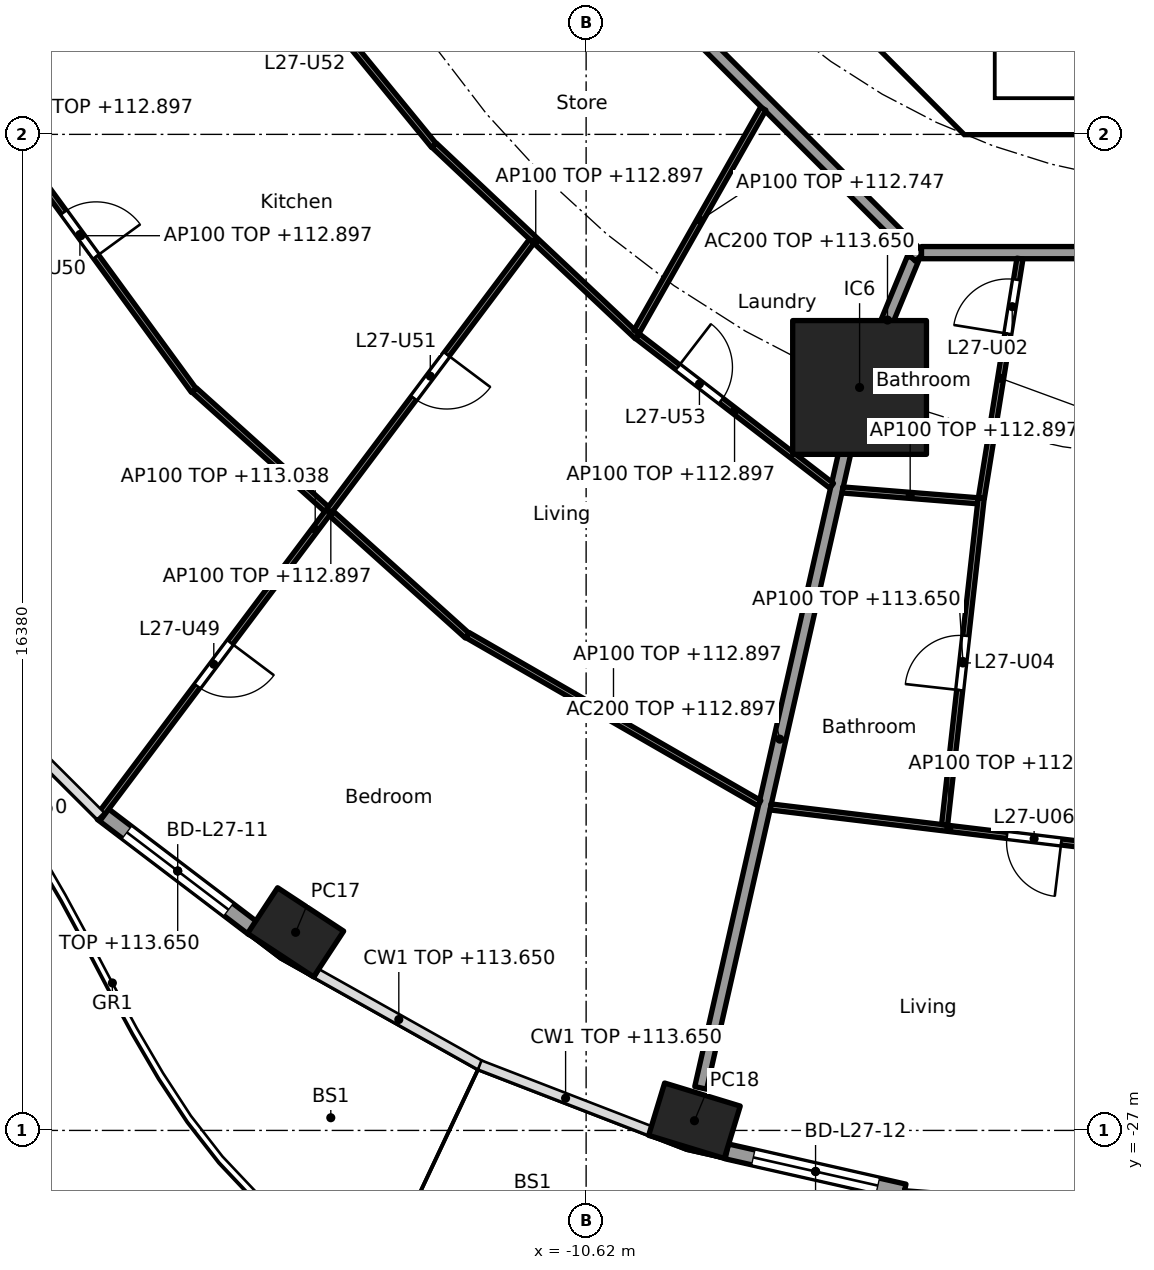
"""IFC4 building model, lengths in metres.
Left out: names, types, materials, properties, quantities, classifications, styles, units other than length and angle.
Written with IfcOpenShell. Run it as: python <this file> out.ifc"""

import sys

from ifc_helpers import new_model, si_unit, direction, frame, frame_2d, origin, origin_2d, place, context, subcontext, project, spatial, polyline, rectangle, hollow_rectangle, outline, extrude, element, fill, save


model = new_model("IFC4")
c1 = context("Model", 3, precision=1e-05, world=origin(), true_north=direction((0.0, 1.0)))
c2 = subcontext(c1, "Body", "Model", "MODEL_VIEW")
j1 = project(units=[si_unit("LENGTHUNIT", "METRE"), si_unit("PLANEANGLEUNIT", "RADIAN")], contexts=[c1])
p1 = place(None, origin())
s1 = spatial("IfcSite", under=j1, at=p1, CompositionType="ELEMENT")
p2 = place(p1, origin())
s2 = spatial("IfcBuilding", under=s1, at=p2, CompositionType="ELEMENT")
p3 = place(p2, frame((0.0, 0.0, 110.3)))
s3 = spatial("IfcBuildingStorey", under=s2, at=p3, CompositionType="ELEMENT", Elevation=110.3)
for number, where, z_axis, x_axis in (
    (1, (-15.397, -23.742, 0.0), (0.0, 0.0, 1.0), (0.836, -0.549, 0.0)),
    (2, (-8.839, -26.841, 0.0), (0.0, 0.0, 1.0), (0.957, -0.292, 0.0)),
):
    element("IfcColumn", number, at=place(p3, frame(where, z_axis=z_axis, x_axis=x_axis)), inside=s3, PredefinedType="COLUMN", context=c2, shape_type="SweptSolid", body=[
        extrude(hollow_rectangle(XDim=1.3, YDim=0.9, WallThickness=0.045, at=origin_2d()), origin(), (0.0, 0.0, 1.0), 3.7),
    ])
p4 = place(p3, frame((-6.123, -14.782, 0.0), z_axis=(0.0, 0.0, 1.0), x_axis=(1.0, 0.0, 0.0)))
e3 = element("IfcColumn", 3, at=p4, inside=s3, PredefinedType="COLUMN", context=c2, shape_type="SweptSolid", body=[
    extrude(rectangle(XDim=2.2, YDim=2.2, at=origin_2d()), origin(), (0.0, 0.0, 1.0), 3.7),
])
p5 = place(p3, frame((-16.089, -23.682, 0.0), z_axis=(0.0, 0.0, 1.0), x_axis=(-0.796037575978, 0.605247203736, 0.0)))
e4 = element("IfcWall", 4, at=p5, inside=s3, PredefinedType="SOLIDWALL", context=c2, shape_type="SweptSolid", body=[
    extrude(rectangle(XDim=3.134, YDim=0.25, at=frame_2d((1.567, 0.0))), origin(), (0.0, 0.0, 1.0), 3.35),
])
p6 = place(p5, frame((0.517, 0.0, 0.0)))
e5 = element("IfcOpeningElement", 5, at=p6, cuts=e4, PredefinedType="OPENING", context=c2, shape_type="SweptSolid", body=[
    extrude(rectangle(XDim=2.1, YDim=2.4, at=frame_2d((1.05, 1.2))), frame((0.0, 0.135, 0.0), z_axis=(0.0, -1.0, 0.0), x_axis=(1.0, 0.0, 0.0)), (0.0, 0.0, 1.0), 0.27),
])
p7 = place(p3, frame((-5.387, -28.006, 0.0), z_axis=(0.0, 0.0, 1.0), x_axis=(-0.975317607872, 0.220806620767, 0.0)))
e6 = element("IfcWall", 6, at=p7, inside=s3, PredefinedType="SOLIDWALL", context=c2, shape_type="SweptSolid", body=[
    extrude(rectangle(XDim=2.993, YDim=0.25, at=frame_2d((1.497, 0.0))), origin(), (0.0, 0.0, 1.0), 3.35),
])
p8 = place(p7, frame((0.447, 0.0, 0.0)))
e7 = element("IfcOpeningElement", 7, at=p8, cuts=e6, PredefinedType="OPENING", context=c2, shape_type="SweptSolid", body=[
    extrude(rectangle(XDim=2.1, YDim=2.4, at=frame_2d((1.05, 1.2))), frame((0.0, 0.135, 0.0), z_axis=(0.0, -1.0, 0.0), x_axis=(1.0, 0.0, 0.0)), (0.0, 0.0, 1.0), 0.27),
])
p9 = place(p3, frame((-9.988, -4.613, 0.0), z_axis=(0.0, 0.0, 1.0), x_axis=(0.707106781187, -0.707106781187, 0.0)))
e8 = element("IfcWall", 8, at=p9, inside=s3, PredefinedType="SHEAR", context=c2, shape_type="SweptSolid", body=[
    extrude(rectangle(XDim=7.602, YDim=0.6, at=frame_2d((3.801, 0.0))), origin(), (0.0, 0.0, 1.0), 3.35),
])
p10 = place(p9, frame((6.151, 0.0, 0.0)))
e9 = element("IfcOpeningElement", 9, at=p10, cuts=e8, PredefinedType="OPENING", context=c2, shape_type="SweptSolid", body=[
    extrude(rectangle(XDim=1.1, YDim=2.1, at=frame_2d((0.55, 1.05))), frame((0.0, 0.31, 0.0), z_axis=(0.0, -1.0, 0.0), x_axis=(1.0, 0.0, 0.0)), (0.0, 0.0, 1.0), 0.62),
])
p11 = place(p3, origin())
e10 = element("IfcWall", 10, at=p11, inside=s3, PredefinedType="SHEAR", context=c2, shape_type="SweptSolid", body=[
    extrude(outline(polyline([(-4.152, -10.025), (4.152, -10.025), (4.401, -9.776), (4.825, -10.2), (4.401, -10.625), (-4.401, -10.625), (-4.825, -10.2), (-4.401, -9.776), (-4.152, -10.025)])), origin(), (0.0, 0.0, 1.0), 3.35),
])
p12 = place(p3, origin())
e11 = element("IfcWall", 11, at=p12, inside=s3, PredefinedType="SOLIDWALL", context=c2, shape_type="SweptSolid", body=[
    extrude(outline(polyline([(-3.9, -10.025), (-4.1, -10.025), (-4.1, -7.025), (-3.9, -7.025), (-3.9, -10.025)])), origin(), (0.0, 0.0, 1.0), 3.35),
])
p13 = place(p3, frame((-5.243, -12.657, 0.0), z_axis=(0.0, 0.0, 1.0), x_axis=(-0.382668627144, -0.923885664896, 0.0)))
e12 = element("IfcWall", 12, at=p13, inside=s3, PredefinedType="PARTITIONING", context=c2, shape_type="SweptSolid", body=[
    extrude(rectangle(XDim=2.2, YDim=0.2, at=frame_2d((1.1, 0.0))), origin(), (0.0, 0.0, 1.0), 3.35),
])
p14 = place(p3, frame((-6.134, -14.831, 0.0), z_axis=(0.0, 0.0, 1.0), x_axis=(-0.221225405869, -0.975222702667, 0.0)))
e13 = element("IfcWall", 13, at=p14, inside=s3, PredefinedType="PARTITIONING", context=c2, shape_type="SweptSolid", body=[
    extrude(rectangle(XDim=11.761, YDim=0.2, at=frame_2d((5.88, 0.0))), origin(), (0.0, 0.0, 1.0), 2.597),
])
p15 = place(p3, frame((-12.635, -5.134, 0.0), z_axis=(0.0, 0.0, 1.0), x_axis=(0.707106781187, -0.707106781187, 0.0)))
e14 = element("IfcWall", 14, at=p15, inside=s3, PredefinedType="PARTITIONING", context=c2, shape_type="SweptSolid", body=[
    extrude(rectangle(XDim=10.609, YDim=0.2, at=frame_2d((5.305, 0.0))), origin(), (0.0, 0.0, 1.0), 3.35),
])
p16 = place(p3, frame((-5.104, -12.565, 0.0), z_axis=(0.0, 0.0, 1.0), x_axis=(1.0, 0.0, 0.0)))
e15 = element("IfcWall", 15, at=p16, inside=s3, PredefinedType="PARTITIONING", context=c2, shape_type="SweptSolid", body=[
    extrude(rectangle(XDim=10.409, YDim=0.2, at=frame_2d((5.205, 0.0))), origin(), (0.0, 0.0, 1.0), 3.35),
])
p17 = place(p16, frame((2.87, 0.0, 0.0)))
e16 = element("IfcOpeningElement", 16, at=p17, cuts=e15, PredefinedType="OPENING", context=c2, shape_type="SweptSolid", body=[
    extrude(rectangle(XDim=1.0, YDim=2.1, at=frame_2d((0.5, 1.05))), frame((0.0, 0.11, 0.0), z_axis=(0.0, -1.0, 0.0), x_axis=(1.0, 0.0, 0.0)), (0.0, 0.0, 1.0), 0.22),
])
p18 = place(p3, frame((-14.825, -6.148, 0.0), z_axis=(0.0, 0.0, 1.0), x_axis=(-0.860400431487, -0.509618580408, 0.0)))
e17 = element("IfcWall", 17, at=p18, inside=s3, PredefinedType="PARTITIONING", context=c2, shape_type="SweptSolid", body=[
    extrude(rectangle(XDim=11.688, YDim=0.1, at=frame_2d((5.844, 0.0))), origin(), (0.0, 0.0, 1.0), 2.597),
])
p19 = place(p18, frame((8.877, 0.0, 0.0)))
e18 = element("IfcOpeningElement", 18, at=p19, cuts=e17, PredefinedType="OPENING", context=c2, shape_type="SweptSolid", body=[
    extrude(rectangle(XDim=0.9, YDim=2.1, at=frame_2d((0.45, 1.05))), frame((0.0, 0.06, 0.0), z_axis=(0.0, -1.0, 0.0), x_axis=(1.0, 0.0, 0.0)), (0.0, 0.0, 1.0), 0.12),
])
p20 = place(p3, frame((-16.214, -7.028, 0.0), z_axis=(0.0, 0.0, 1.0), x_axis=(0.633412158846, -0.773814601197, 0.0)))
e19 = element("IfcWall", 19, at=p20, inside=s3, PredefinedType="PARTITIONING", context=c2, shape_type="SweptSolid", body=[
    extrude(rectangle(XDim=4.879, YDim=0.1, at=frame_2d((2.439, 0.0))), origin(), (0.0, 0.0, 1.0), 2.597),
])
p21 = place(p20, frame((1.965, 0.0, 0.0)))
e20 = element("IfcOpeningElement", 20, at=p21, cuts=e19, PredefinedType="OPENING", context=c2, shape_type="SweptSolid", body=[
    extrude(rectangle(XDim=0.9, YDim=2.1, at=frame_2d((0.45, 1.05))), frame((0.0, 0.06, 0.0), z_axis=(0.0, -1.0, 0.0), x_axis=(1.0, 0.0, 0.0)), (0.0, 0.0, 1.0), 0.12),
])
p22 = place(p3, frame((-20.79, -9.739, 0.0), z_axis=(0.0, 0.0, 1.0), x_axis=(0.589595343438, -0.807698787294, 0.0)))
e21 = element("IfcWall", 21, at=p22, inside=s3, PredefinedType="PARTITIONING", context=c2, shape_type="SweptSolid", body=[
    extrude(rectangle(XDim=6.308, YDim=0.1, at=frame_2d((3.154, 0.0))), origin(), (0.0, 0.0, 1.0), 2.597),
])
p23 = place(p22, frame((2.679, 0.0, 0.0)))
e22 = element("IfcOpeningElement", 22, at=p23, cuts=e21, PredefinedType="OPENING", context=c2, shape_type="SweptSolid", body=[
    extrude(rectangle(XDim=0.9, YDim=2.1, at=frame_2d((0.45, 1.05))), frame((0.0, 0.06, 0.0), z_axis=(0.0, -1.0, 0.0), x_axis=(1.0, 0.0, 0.0)), (0.0, 0.0, 1.0), 0.12),
])
p24 = place(p3, frame((-13.118, -10.8, 0.0), z_axis=(0.0, 0.0, 1.0), x_axis=(0.72818280142, -0.685382964273, 0.0)))
e23 = element("IfcWall", 23, at=p24, inside=s3, PredefinedType="PARTITIONING", context=c2, shape_type="SweptSolid", body=[
    extrude(rectangle(XDim=4.586, YDim=0.1, at=frame_2d((2.293, 0.0))), origin(), (0.0, 0.0, 1.0), 2.597),
])
p25 = place(p3, frame((-17.063, -14.827, 0.0), z_axis=(0.0, 0.0, 1.0), x_axis=(0.743485143578, -0.668752451419, 0.0)))
e24 = element("IfcWall", 24, at=p25, inside=s3, PredefinedType="PARTITIONING", context=c2, shape_type="SweptSolid", body=[
    extrude(rectangle(XDim=6.037, YDim=0.1, at=frame_2d((3.019, 0.0))), origin(), (0.0, 0.0, 1.0), 2.597),
])
p26 = place(p3, frame((-11.515, -12.377, 0.0), z_axis=(0.0, 0.0, 1.0), x_axis=(-0.600741245554, -0.799443528893, 0.0)))
e25 = element("IfcWall", 25, at=p26, inside=s3, PredefinedType="PARTITIONING", context=c2, shape_type="SweptSolid", body=[
    extrude(rectangle(XDim=11.853, YDim=0.1, at=frame_2d((5.927, 0.0))), origin(), (0.0, 0.0, 1.0), 2.738),
])
p27 = place(p26, frame((8.253, 0.0, 0.0)))
e26 = element("IfcOpeningElement", 26, at=p27, cuts=e25, PredefinedType="OPENING", context=c2, shape_type="SweptSolid", body=[
    extrude(rectangle(XDim=0.9, YDim=2.1, at=frame_2d((0.45, 1.05))), frame((0.0, 0.06, 0.0), z_axis=(0.0, -1.0, 0.0), x_axis=(1.0, 0.0, 0.0)), (0.0, 0.0, 1.0), 0.12),
])
p28 = place(p26, frame((2.326, 0.0, 0.0)))
e27 = element("IfcOpeningElement", 27, at=p28, cuts=e25, PredefinedType="OPENING", context=c2, shape_type="SweptSolid", body=[
    extrude(rectangle(XDim=0.9, YDim=2.1, at=frame_2d((0.45, 1.05))), frame((0.0, 0.06, 0.0), z_axis=(0.0, -1.0, 0.0), x_axis=(1.0, 0.0, 0.0)), (0.0, 0.0, 1.0), 0.12),
])
p29 = place(p3, frame((-7.707, -10.198, 0.0), z_axis=(0.0, 0.0, 1.0), x_axis=(-0.493986531217, -0.869469554945, 0.0)))
e28 = element("IfcWall", 28, at=p29, inside=s3, PredefinedType="PARTITIONING", context=c2, shape_type="SweptSolid", body=[
    extrude(rectangle(XDim=4.217, YDim=0.1, at=frame_2d((2.109, 0.0))), origin(), (0.0, 0.0, 1.0), 2.447),
])
p30 = place(p3, frame((-9.775, -13.939, 0.0), z_axis=(0.0, 0.0, 1.0), x_axis=(0.792162117554, -0.610310723741, 0.0)))
e29 = element("IfcWall", 29, at=p30, inside=s3, PredefinedType="PARTITIONING", context=c2, shape_type="SweptSolid", body=[
    extrude(rectangle(XDim=4.03, YDim=0.1, at=frame_2d((2.015, 0.0))), origin(), (0.0, 0.0, 1.0), 2.597),
])
p31 = place(p30, frame((0.836, 0.0, 0.0)))
e30 = element("IfcOpeningElement", 30, at=p31, cuts=e29, PredefinedType="OPENING", context=c2, shape_type="SweptSolid", body=[
    extrude(rectangle(XDim=0.9, YDim=2.1, at=frame_2d((0.45, 1.05))), frame((0.0, 0.06, 0.0), z_axis=(0.0, -1.0, 0.0), x_axis=(1.0, 0.0, 0.0)), (0.0, 0.0, 1.0), 0.12),
])
p32 = place(p3, frame((-12.568, -18.856, 0.0), z_axis=(0.0, 0.0, 1.0), x_axis=(0.866533437451, -0.499119025664, 0.0)))
e31 = element("IfcWall", 31, at=p32, inside=s3, PredefinedType="PARTITIONING", context=c2, shape_type="SweptSolid", body=[
    extrude(rectangle(XDim=5.535, YDim=0.1, at=frame_2d((2.768, 0.0))), origin(), (0.0, 0.0, 1.0), 2.597),
])
p33 = place(p3, frame((-6.404, -16.468, 0.0), z_axis=(0.0, 0.0, 1.0), x_axis=(0.996819101134, -0.079697425392, 0.0)))
e32 = element("IfcWall", 32, at=p33, inside=s3, PredefinedType="PARTITIONING", context=c2, shape_type="SweptSolid", body=[
    extrude(rectangle(XDim=2.233, YDim=0.1, at=frame_2d((1.117, 0.0))), origin(), (0.0, 0.0, 1.0), 2.597),
])
p34 = place(p3, frame((-7.586, -21.68, 0.0), z_axis=(0.0, 0.0, 1.0), x_axis=(0.992810535213, -0.119696454295, 0.0)))
e33 = element("IfcWall", 33, at=p34, inside=s3, PredefinedType="PARTITIONING", context=c2, shape_type="SweptSolid", body=[
    extrude(rectangle(XDim=5.903, YDim=0.1, at=frame_2d((2.951, 0.0))), origin(), (0.0, 0.0, 1.0), 2.597),
])
p35 = place(p34, frame((3.915, 0.0, 0.0)))
e34 = element("IfcOpeningElement", 34, at=p35, cuts=e33, PredefinedType="OPENING", context=c2, shape_type="SweptSolid", body=[
    extrude(rectangle(XDim=0.9, YDim=2.1, at=frame_2d((0.45, 1.05))), frame((0.0, 0.06, 0.0), z_axis=(0.0, -1.0, 0.0), x_axis=(1.0, 0.0, 0.0)), (0.0, 0.0, 1.0), 0.12),
])
p36 = place(p3, frame((-3.486, -12.664, 0.0), z_axis=(0.0, 0.0, 1.0), x_axis=(-0.159124641548, -0.987258501332, 0.0)))
e35 = element("IfcWall", 35, at=p36, inside=s3, PredefinedType="PARTITIONING", context=c2, shape_type="SweptSolid", body=[
    extrude(rectangle(XDim=3.988, YDim=0.1, at=frame_2d((1.994, 0.0))), origin(), (0.0, 0.0, 1.0), 2.447),
])
p37 = place(p36, frame((0.35, 0.0, 0.0)))
e36 = element("IfcOpeningElement", 36, at=p37, cuts=e35, PredefinedType="OPENING", context=c2, shape_type="SweptSolid", body=[
    extrude(rectangle(XDim=0.9, YDim=2.1, at=frame_2d((0.45, 1.05))), frame((0.0, 0.06, 0.0), z_axis=(0.0, -1.0, 0.0), x_axis=(1.0, 0.0, 0.0)), (0.0, 0.0, 1.0), 0.12),
])
p38 = place(p3, frame((-4.122, -16.6, 0.0), z_axis=(0.0, 0.0, 1.0), x_axis=(-0.111357928679, -0.993780363924, 0.0)))
e37 = element("IfcWall", 37, at=p38, inside=s3, PredefinedType="PARTITIONING", context=c2, shape_type="SweptSolid", body=[
    extrude(rectangle(XDim=5.409, YDim=0.1, at=frame_2d((2.704, 0.0))), origin(), (0.0, 0.0, 1.0), 3.35),
])
p39 = place(p38, frame((2.279, 0.0, 0.0)))
e38 = element("IfcOpeningElement", 38, at=p39, cuts=e37, PredefinedType="OPENING", context=c2, shape_type="SweptSolid", body=[
    extrude(rectangle(XDim=0.9, YDim=2.1, at=frame_2d((0.45, 1.05))), frame((0.0, 0.06, 0.0), z_axis=(0.0, -1.0, 0.0), x_axis=(1.0, 0.0, 0.0)), (0.0, 0.0, 1.0), 0.12),
])
p40 = place(p6, origin())
e39 = element("IfcDoor", 39, at=p40, inside=s3, OperationType="SLIDING_TO_LEFT", PredefinedType="DOOR", context=c2, shape_type="SweptSolid", body=[
    extrude(rectangle(XDim=2.1, YDim=2.4, at=frame_2d((1.05, 1.2))), frame((0.0, 0.025, 0.0), z_axis=(0.0, -1.0, 0.0), x_axis=(1.0, 0.0, 0.0)), (0.0, 0.0, 1.0), 0.05),
])
fill(e5, e39)
p41 = place(p8, origin())
e40 = element("IfcDoor", 40, at=p41, inside=s3, OperationType="SLIDING_TO_LEFT", PredefinedType="DOOR", context=c2, shape_type="SweptSolid", body=[
    extrude(rectangle(XDim=2.1, YDim=2.4, at=frame_2d((1.05, 1.2))), frame((0.0, 0.025, 0.0), z_axis=(0.0, -1.0, 0.0), x_axis=(1.0, 0.0, 0.0)), (0.0, 0.0, 1.0), 0.05),
])
fill(e7, e40)
p42 = place(p10, origin())
e41 = element("IfcDoor", 41, at=p42, inside=s3, OperationType="SINGLE_SWING_RIGHT", PredefinedType="DOOR", context=c2, shape_type="SweptSolid", body=[
    extrude(rectangle(XDim=1.1, YDim=2.1, at=frame_2d((0.55, 1.05))), frame((0.0, 0.025, 0.0), z_axis=(0.0, -1.0, 0.0), x_axis=(1.0, 0.0, 0.0)), (0.0, 0.0, 1.0), 0.05),
])
fill(e9, e41)
p43 = place(p37, frame((0.9, 0.0, 0.0), x_axis=(-1.0, 0.0, 0.0)))
e42 = element("IfcDoor", 42, at=p43, inside=s3, OperationType="SINGLE_SWING_LEFT", PredefinedType="DOOR", context=c2, shape_type="SweptSolid", body=[
    extrude(rectangle(XDim=0.9, YDim=2.1, at=frame_2d((0.45, 1.05))), frame((0.0, 0.025, 0.0), z_axis=(0.0, -1.0, 0.0), x_axis=(1.0, 0.0, 0.0)), (0.0, 0.0, 1.0), 0.05),
])
fill(e36, e42)
p44 = place(p39, frame((0.9, 0.0, 0.0), x_axis=(-1.0, 0.0, 0.0)))
e43 = element("IfcDoor", 43, at=p44, inside=s3, OperationType="SINGLE_SWING_LEFT", PredefinedType="DOOR", context=c2, shape_type="SweptSolid", body=[
    extrude(rectangle(XDim=0.9, YDim=2.1, at=frame_2d((0.45, 1.05))), frame((0.0, 0.025, 0.0), z_axis=(0.0, -1.0, 0.0), x_axis=(1.0, 0.0, 0.0)), (0.0, 0.0, 1.0), 0.05),
])
fill(e38, e43)
p45 = place(p35, frame((0.9, 0.0, 0.0), x_axis=(-1.0, 0.0, 0.0)))
e44 = element("IfcDoor", 44, at=p45, inside=s3, OperationType="SINGLE_SWING_LEFT", PredefinedType="DOOR", context=c2, shape_type="SweptSolid", body=[
    extrude(rectangle(XDim=0.9, YDim=2.1, at=frame_2d((0.45, 1.05))), frame((0.0, 0.025, 0.0), z_axis=(0.0, -1.0, 0.0), x_axis=(1.0, 0.0, 0.0)), (0.0, 0.0, 1.0), 0.05),
])
fill(e34, e44)
p46 = place(p27, origin())
e45 = element("IfcDoor", 45, at=p46, inside=s3, OperationType="SINGLE_SWING_LEFT", PredefinedType="DOOR", context=c2, shape_type="SweptSolid", body=[
    extrude(rectangle(XDim=0.9, YDim=2.1, at=frame_2d((0.45, 1.05))), frame((0.0, 0.025, 0.0), z_axis=(0.0, -1.0, 0.0), x_axis=(1.0, 0.0, 0.0)), (0.0, 0.0, 1.0), 0.05),
])
fill(e26, e45)
p47 = place(p23, origin())
e46 = element("IfcDoor", 46, at=p47, inside=s3, OperationType="SINGLE_SWING_RIGHT", PredefinedType="DOOR", context=c2, shape_type="SweptSolid", body=[
    extrude(rectangle(XDim=0.9, YDim=2.1, at=frame_2d((0.45, 1.05))), frame((0.0, 0.025, 0.0), z_axis=(0.0, -1.0, 0.0), x_axis=(1.0, 0.0, 0.0)), (0.0, 0.0, 1.0), 0.05),
])
fill(e22, e46)
p48 = place(p28, origin())
e47 = element("IfcDoor", 47, at=p48, inside=s3, OperationType="SINGLE_SWING_LEFT", PredefinedType="DOOR", context=c2, shape_type="SweptSolid", body=[
    extrude(rectangle(XDim=0.9, YDim=2.1, at=frame_2d((0.45, 1.05))), frame((0.0, 0.025, 0.0), z_axis=(0.0, -1.0, 0.0), x_axis=(1.0, 0.0, 0.0)), (0.0, 0.0, 1.0), 0.05),
])
fill(e27, e47)
p49 = place(p31, origin())
e48 = element("IfcDoor", 48, at=p49, inside=s3, OperationType="SINGLE_SWING_LEFT", PredefinedType="DOOR", context=c2, shape_type="SweptSolid", body=[
    extrude(rectangle(XDim=0.9, YDim=2.1, at=frame_2d((0.45, 1.05))), frame((0.0, 0.025, 0.0), z_axis=(0.0, -1.0, 0.0), x_axis=(1.0, 0.0, 0.0)), (0.0, 0.0, 1.0), 0.05),
])
fill(e30, e48)
save(model, sys.argv[1])
